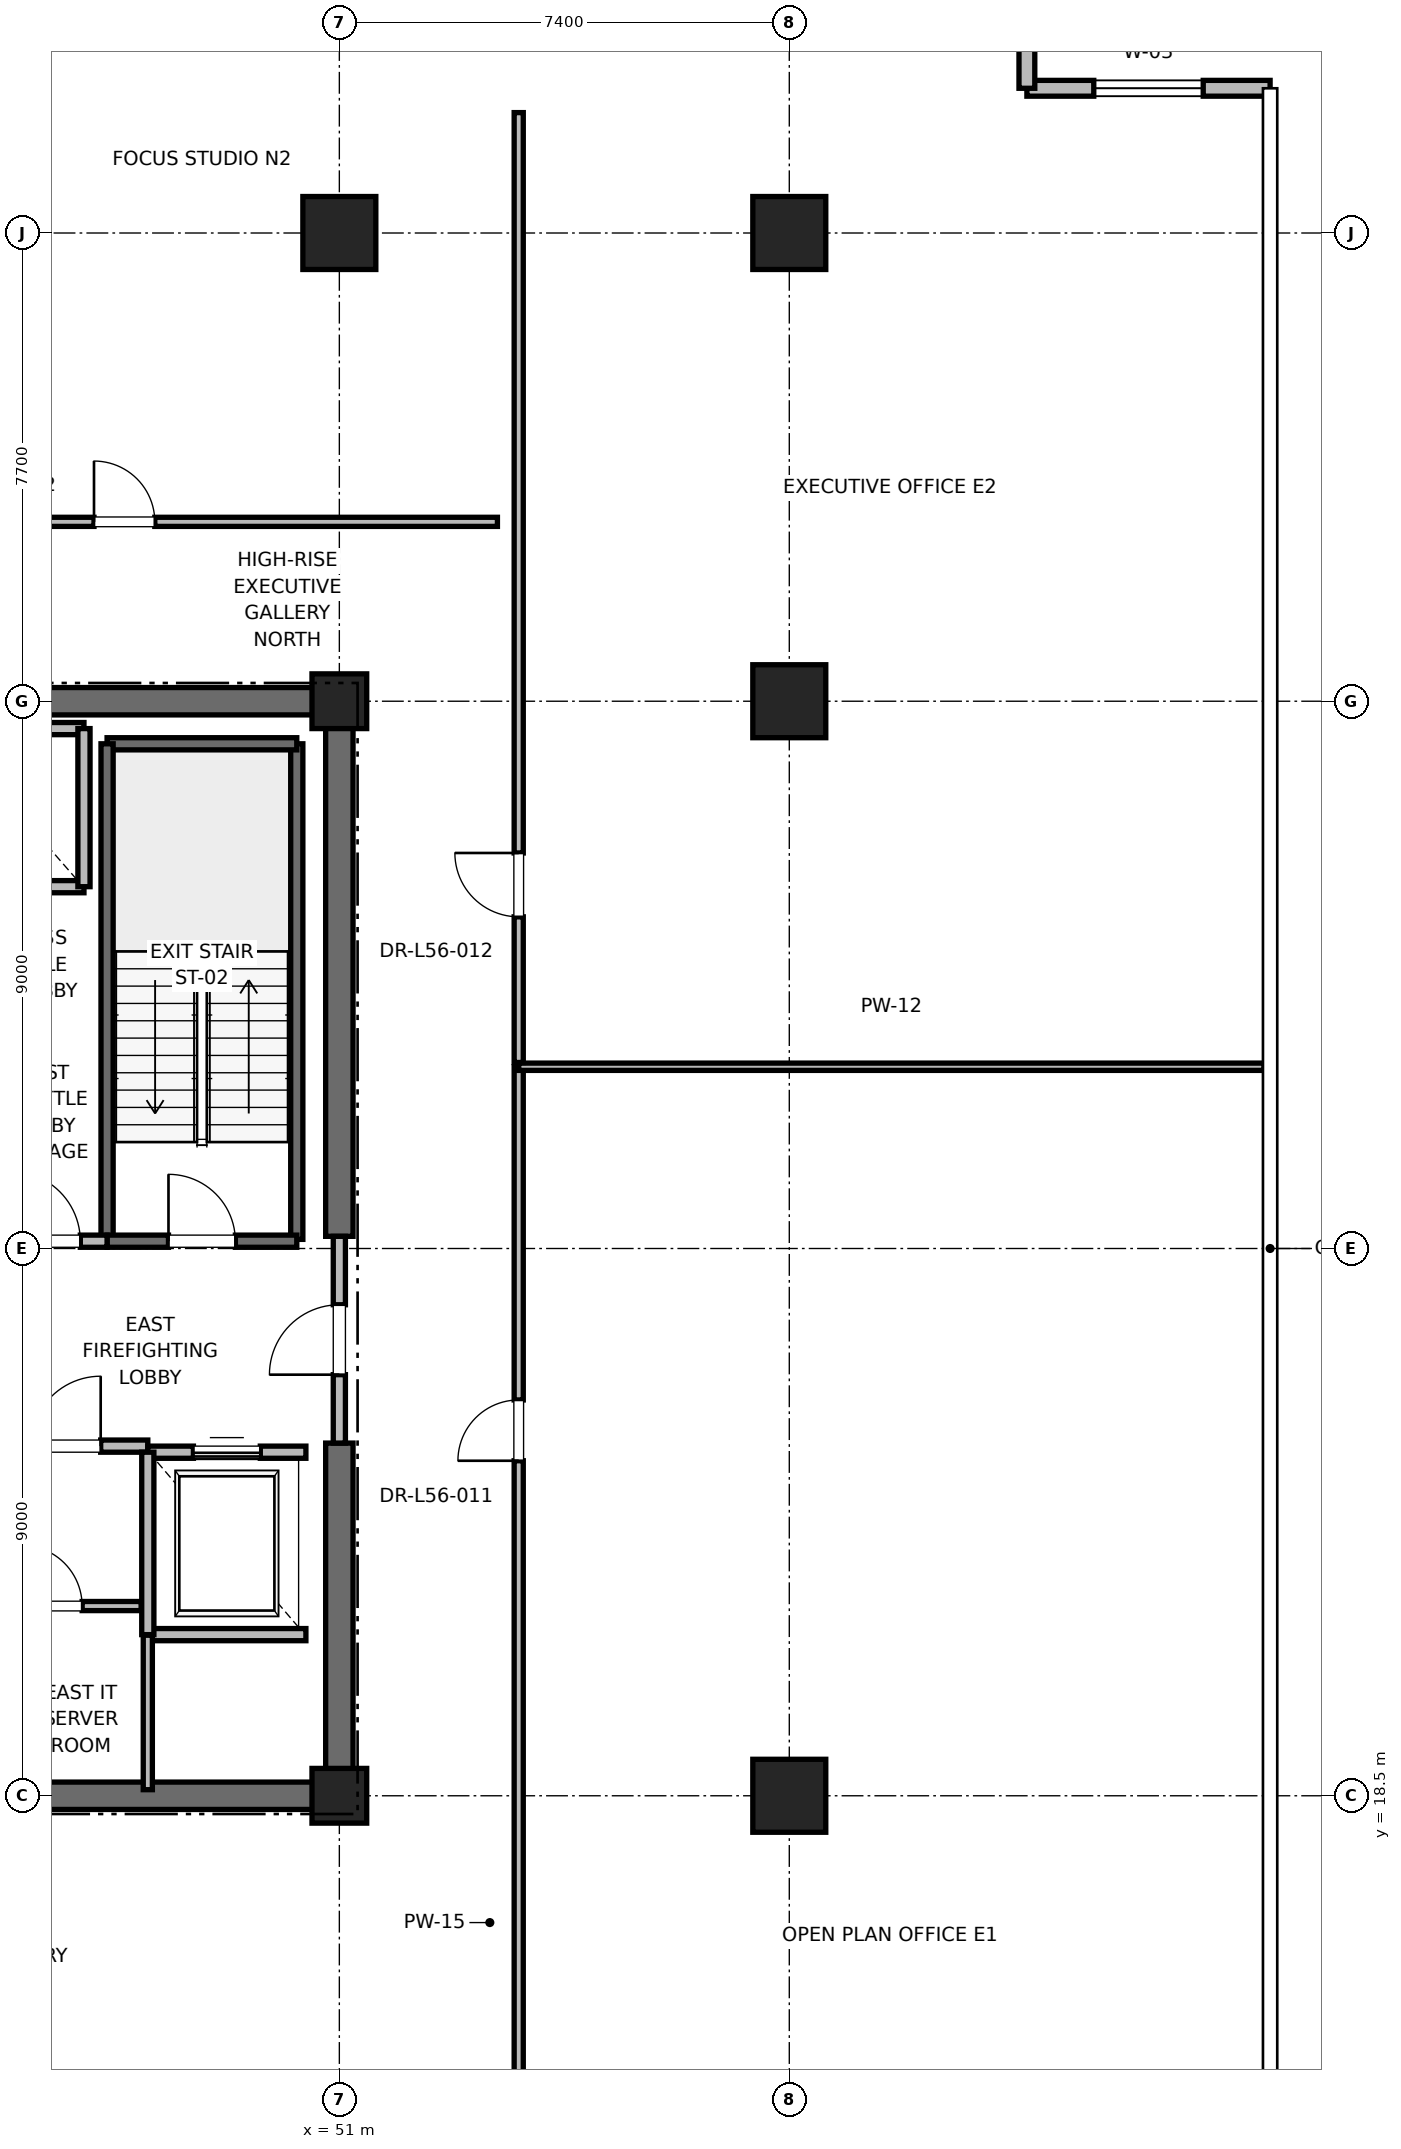
"""IFC4 building model, lengths in metres.
Left out: names, types, materials, properties, quantities, classifications, styles, units other than length and angle.
Written with IfcOpenShell. Run it as: python <this file> out.ifc"""

import sys

from ifc_helpers import new_model, si_unit, direction, frame, frame_2d, origin, origin_2d, place, context, subcontext, project, spatial, rectangle, extrude, element, fill, save


model = new_model("IFC4")
c1 = context("Model", 3, precision=1e-05, world=origin(), true_north=direction((0.0, 1.0)))
c2 = subcontext(c1, "Body", "Model", "MODEL_VIEW")
j1 = project(units=[si_unit("LENGTHUNIT", "METRE"), si_unit("PLANEANGLEUNIT", "RADIAN")], contexts=[c1])
p1 = place(None, origin())
s1 = spatial("IfcSite", under=j1, at=p1, CompositionType="ELEMENT")
p2 = place(p1, origin())
s2 = spatial("IfcBuilding", under=s1, at=p2, CompositionType="ELEMENT")
p3 = place(p2, frame((0.0, 0.0, 243.2)))
s3 = spatial("IfcBuildingStorey", under=s2, at=p3, CompositionType="ELEMENT", Elevation=243.2)
for number, where, z_axis, x_axis in (
    (1, (51.0, 44.2, 0.0), (0.0, 0.0, 1.0), (1.0, 0.0, 0.0)),
    (2, (58.4, 18.5, 0.0), (0.0, 0.0, 1.0), (1.0, 0.0, 0.0)),
    (3, (58.4, 36.5, 0.0), (0.0, 0.0, 1.0), (1.0, 0.0, 0.0)),
    (4, (58.4, 44.2, 0.0), (0.0, 0.0, 1.0), (1.0, 0.0, 0.0)),
):
    element("IfcColumn", number, at=place(p3, frame(where, z_axis=z_axis, x_axis=x_axis)), inside=s3, PredefinedType="COLUMN", context=c2, shape_type="SweptSolid", body=[
        extrude(rectangle(XDim=1.2, YDim=1.2, at=origin_2d()), origin(), (0.0, 0.0, 1.0), 4.0),
    ])
for number, where, z_axis, x_axis in (
    (5, (51.0, 18.5, 0.0), (0.0, 0.0, 1.0), (1.0, 0.0, 0.0)),
    (6, (51.0, 36.5, 0.0), (0.0, 0.0, 1.0), (1.0, 0.0, 0.0)),
):
    element("IfcColumn", number, at=place(p3, frame(where, z_axis=z_axis, x_axis=x_axis)), inside=s3, PredefinedType="PILASTER", context=c2, shape_type="SweptSolid", body=[
        extrude(rectangle(XDim=0.9, YDim=0.9, at=origin_2d()), origin(), (0.0, 0.0, 1.0), 4.0),
    ])
p4 = place(p3, frame((41.8, 18.5, 0.0), z_axis=(0.0, 0.0, 1.0), x_axis=(1.0, 0.0, 0.0)))
e7 = element("IfcWall", 7, at=p4, inside=s3, PredefinedType="SHEAR", context=c2, shape_type="SweptSolid", body=[
    extrude(rectangle(XDim=9.2, YDim=0.45, at=frame_2d((4.6, 0.0))), origin(), (0.0, 0.0, 1.0), 3.785),
])
for number, where, z_axis, x_axis in (
    (8, (45.2, 36.5, 0.0), (0.0, 0.0, 1.0), (1.0, 0.0, 0.0)),
    (9, (51.0, 18.5, 0.0), (0.0, 0.0, 1.0), (0.0, 1.0, 0.0)),
):
    element("IfcWall", number, at=place(p3, frame(where, z_axis=z_axis, x_axis=x_axis)), inside=s3, PredefinedType="SHEAR", context=c2, shape_type="SweptSolid", body=[
        extrude(rectangle(XDim=5.8, YDim=0.45, at=frame_2d((2.9, 0.0))), origin(), (0.0, 0.0, 1.0), 3.785),
    ])
p5 = place(p3, frame((51.0, 27.7, 0.0), z_axis=(0.0, 0.0, 1.0), x_axis=(0.0, 1.0, 0.0)))
e10 = element("IfcWall", 10, at=p5, inside=s3, PredefinedType="SHEAR", context=c2, shape_type="SweptSolid", body=[
    extrude(rectangle(XDim=8.8, YDim=0.45, at=frame_2d((4.4, 0.0))), origin(), (0.0, 0.0, 1.0), 3.785),
])
p6 = place(p3, frame((66.308, 46.58, 0.0), z_axis=(0.0, 0.0, 1.0), x_axis=(-1.0, 0.0, 0.0)))
e11 = element("IfcWall", 11, at=p6, inside=s3, PredefinedType="PARAPET", context=c2, shape_type="SweptSolid", body=[
    extrude(rectangle(XDim=4.0, YDim=0.26, at=frame_2d((2.0, 0.0))), origin(), (0.0, 0.0, 1.0), 3.785),
])
p7 = place(p6, frame((1.1, 0.0, 0.85)))
e12 = element("IfcOpeningElement", 12, at=p7, cuts=e11, PredefinedType="OPENING", context=c2, shape_type="SweptSolid", body=[
    extrude(rectangle(XDim=1.8, YDim=2.2, at=frame_2d((0.9, 1.1))), frame((0.0, 0.13, 0.0), z_axis=(0.0, -1.0, 0.0), x_axis=(1.0, 0.0, 0.0)), (0.0, 0.0, 1.0), 0.26),
])
p8 = place(p3, frame((62.308, 46.58, 0.0), z_axis=(0.0, 0.0, 1.0), x_axis=(0.0, 1.0, 0.0)))
e13 = element("IfcWall", 13, at=p8, inside=s3, PredefinedType="PARAPET", context=c2, shape_type="SweptSolid", body=[
    extrude(rectangle(XDim=3.5, YDim=0.26, at=frame_2d((1.75, 0.0))), origin(), (0.0, 0.0, 1.0), 3.785),
])
p9 = place(p3, frame((50.3, 27.65, 0.0), z_axis=(0.0, 0.0, 1.0), x_axis=(0.0, 1.0, 0.0)))
e14 = element("IfcWall", 14, at=p9, inside=s3, PredefinedType="SOLIDWALL", context=c2, shape_type="SweptSolid", body=[
    extrude(rectangle(XDim=8.15, YDim=0.2, at=frame_2d((4.075, 0.0))), origin(), (0.0, 0.0, 1.0), 3.785),
])
p10 = place(p3, frame((47.18, 35.8, 0.0), z_axis=(0.0, 0.0, 1.0), x_axis=(1.0, 0.0, 0.0)))
e15 = element("IfcWall", 15, at=p10, inside=s3, PredefinedType="SOLIDWALL", context=c2, shape_type="SweptSolid", body=[
    extrude(rectangle(XDim=3.12, YDim=0.2, at=frame_2d((1.56, 0.0))), origin(), (0.0, 0.0, 1.0), 3.785),
])
p11 = place(p3, frame((47.18, 27.62, 0.0), z_axis=(0.0, 0.0, 1.0), x_axis=(0.0, 1.0, 0.0)))
e16 = element("IfcWall", 16, at=p11, inside=s3, PredefinedType="SOLIDWALL", context=c2, shape_type="SweptSolid", body=[
    extrude(rectangle(XDim=8.18, YDim=0.2, at=frame_2d((4.09, 0.0))), origin(), (0.0, 0.0, 1.0), 3.785),
])
p12 = place(p3, frame((47.18, 27.62, 0.0), z_axis=(0.0, 0.0, 1.0), x_axis=(1.0, 0.0, 0.0)))
e17 = element("IfcWall", 17, at=p12, inside=s3, PredefinedType="SOLIDWALL", context=c2, shape_type="SweptSolid", body=[
    extrude(rectangle(XDim=3.12, YDim=0.2, at=frame_2d((1.56, 0.0))), origin(), (0.0, 0.0, 1.0), 3.785),
])
p13 = place(p12, frame((1.01, 0.0, 0.0)))
e18 = element("IfcOpeningElement", 18, at=p13, cuts=e17, PredefinedType="OPENING", context=c2, shape_type="SweptSolid", body=[
    extrude(rectangle(XDim=1.1, YDim=2.15, at=frame_2d((0.55, 1.075))), frame((0.0, 0.1, 0.0), z_axis=(0.0, -1.0, 0.0), x_axis=(1.0, 0.0, 0.0)), (0.0, 0.0, 1.0), 0.2),
])
p14 = place(p3, frame((45.15, 24.25, 0.0), z_axis=(0.0, 0.0, 1.0), x_axis=(1.0, 0.0, 0.0)))
e19 = element("IfcWall", 19, at=p14, inside=s3, PredefinedType="PARTITIONING", context=c2, shape_type="SweptSolid", body=[
    extrude(rectangle(XDim=2.7, YDim=0.2, at=frame_2d((1.35, 0.0))), origin(), (0.0, 0.0, 1.0), 3.785),
])
p15 = place(p14, frame((0.775, 0.0, 0.0)))
e20 = element("IfcOpeningElement", 20, at=p15, cuts=e19, PredefinedType="OPENING", context=c2, shape_type="SweptSolid", body=[
    extrude(rectangle(XDim=1.15, YDim=2.2, at=frame_2d((0.575, 1.1))), frame((0.0, 0.1, 0.0), z_axis=(0.0, -1.0, 0.0), x_axis=(1.0, 0.0, 0.0)), (0.0, 0.0, 1.0), 0.2),
])
p16 = place(p3, frame((45.15, 27.62, 0.0), z_axis=(0.0, 0.0, 1.0), x_axis=(1.0, 0.0, 0.0)))
e21 = element("IfcWall", 21, at=p16, inside=s3, PredefinedType="PARTITIONING", context=c2, shape_type="SweptSolid", body=[
    extrude(rectangle(XDim=2.03, YDim=0.2, at=frame_2d((1.015, 0.0))), origin(), (0.0, 0.0, 1.0), 3.785),
])
p17 = place(p16, frame((0.44, 0.0, 0.0)))
e22 = element("IfcOpeningElement", 22, at=p17, cuts=e21, PredefinedType="OPENING", context=c2, shape_type="SweptSolid", body=[
    extrude(rectangle(XDim=1.15, YDim=2.2, at=frame_2d((0.575, 1.1))), frame((0.0, 0.1, 0.0), z_axis=(0.0, -1.0, 0.0), x_axis=(1.0, 0.0, 0.0)), (0.0, 0.0, 1.0), 0.2),
])
p18 = place(p3, frame((51.0, 24.3, 0.0), z_axis=(0.0, 0.0, 1.0), x_axis=(0.0, 1.0, 0.0)))
e23 = element("IfcWall", 23, at=p18, inside=s3, PredefinedType="PARTITIONING", context=c2, shape_type="SweptSolid", body=[
    extrude(rectangle(XDim=3.4, YDim=0.2, at=frame_2d((1.7, 0.0))), origin(), (0.0, 0.0, 1.0), 2.865),
])
p19 = place(p18, frame((1.125, 0.0, 0.0)))
e24 = element("IfcOpeningElement", 24, at=p19, cuts=e23, PredefinedType="OPENING", context=c2, shape_type="SweptSolid", body=[
    extrude(rectangle(XDim=1.15, YDim=2.2, at=frame_2d((0.575, 1.1))), frame((0.0, 0.1, 0.0), z_axis=(0.0, -1.0, 0.0), x_axis=(1.0, 0.0, 0.0)), (0.0, 0.0, 1.0), 0.2),
])
p20 = place(p3, frame((47.85, 21.15, 0.0), z_axis=(0.0, 0.0, 1.0), x_axis=(1.0, 0.0, 0.0)))
e25 = element("IfcWall", 25, at=p20, inside=s3, PredefinedType="SOLIDWALL", context=c2, shape_type="SweptSolid", body=[
    extrude(rectangle(XDim=2.6, YDim=0.2, at=frame_2d((1.3, 0.0))), origin(), (0.0, 0.0, 1.0), 3.785),
])
p21 = place(p3, frame((50.45, 24.15, 0.0), z_axis=(0.0, 0.0, 1.0), x_axis=(-1.0, 0.0, 0.0)))
e26 = element("IfcWall", 26, at=p21, inside=s3, PredefinedType="SOLIDWALL", context=c2, shape_type="SweptSolid", body=[
    extrude(rectangle(XDim=2.6, YDim=0.2, at=frame_2d((1.3, 0.0))), origin(), (0.0, 0.0, 1.0), 2.865),
])
p22 = place(p21, frame((0.75, 0.0, 0.0)))
e27 = element("IfcOpeningElement", 27, at=p22, cuts=e26, PredefinedType="OPENING", context=c2, shape_type="SweptSolid", body=[
    extrude(rectangle(XDim=1.1, YDim=2.2, at=frame_2d((0.55, 1.1))), frame((0.0, 0.1, 0.0), z_axis=(0.0, -1.0, 0.0), x_axis=(1.0, 0.0, 0.0)), (0.0, 0.0, 1.0), 0.2),
])
p23 = place(p3, frame((47.85, 24.15, 0.0), z_axis=(0.0, 0.0, 1.0), x_axis=(0.0, -1.0, 0.0)))
e28 = element("IfcWall", 28, at=p23, inside=s3, PredefinedType="SOLIDWALL", context=c2, shape_type="SweptSolid", body=[
    extrude(rectangle(XDim=3.0, YDim=0.2, at=frame_2d((1.5, 0.0))), origin(), (0.0, 0.0, 1.0), 3.785),
])
p24 = place(p3, frame((44.5, 33.45, 0.0), z_axis=(0.0, 0.0, 1.0), x_axis=(1.0, 0.0, 0.0)))
e29 = element("IfcWall", 29, at=p24, inside=s3, PredefinedType="SOLIDWALL", context=c2, shape_type="SweptSolid", body=[
    extrude(rectangle(XDim=2.3, YDim=0.2, at=frame_2d((1.15, 0.0))), origin(), (0.0, 0.0, 1.0), 3.785),
])
p25 = place(p3, frame((46.8, 36.05, 0.0), z_axis=(0.0, 0.0, 1.0), x_axis=(-1.0, 0.0, 0.0)))
e30 = element("IfcWall", 30, at=p25, inside=s3, PredefinedType="SOLIDWALL", context=c2, shape_type="SweptSolid", body=[
    extrude(rectangle(XDim=2.3, YDim=0.2, at=frame_2d((1.15, 0.0))), origin(), (0.0, 0.0, 1.0), 2.865),
])
p26 = place(p3, frame((46.8, 33.45, 0.0), z_axis=(0.0, 0.0, 1.0), x_axis=(0.0, 1.0, 0.0)))
e31 = element("IfcWall", 31, at=p26, inside=s3, PredefinedType="SOLIDWALL", context=c2, shape_type="SweptSolid", body=[
    extrude(rectangle(XDim=2.6, YDim=0.2, at=frame_2d((1.3, 0.0))), origin(), (0.0, 0.0, 1.0), 3.785),
])
p27 = place(p3, frame((47.85, 18.6, 0.0), z_axis=(0.0, 0.0, 1.0), x_axis=(0.0, 1.0, 0.0)))
e32 = element("IfcWall", 32, at=p27, inside=s3, PredefinedType="PARTITIONING", context=c2, shape_type="SweptSolid", body=[
    extrude(rectangle(XDim=2.54, YDim=0.15, at=frame_2d((1.27, 0.0))), origin(), (0.0, 0.0, 1.0), 2.85),
])
p28 = place(p3, frame((44.8, 21.62, 0.0), z_axis=(0.0, 0.0, 1.0), x_axis=(1.0, 0.0, 0.0)))
e33 = element("IfcWall", 33, at=p28, inside=s3, PredefinedType="PARTITIONING", context=c2, shape_type="SweptSolid", body=[
    extrude(rectangle(XDim=2.94, YDim=0.15, at=frame_2d((1.47, 0.0))), origin(), (0.0, 0.0, 1.0), 2.85),
])
p29 = place(p28, frame((0.97, 0.0, 0.0)))
e34 = element("IfcOpeningElement", 34, at=p29, cuts=e33, PredefinedType="OPENING", context=c2, shape_type="SweptSolid", body=[
    extrude(rectangle(XDim=1.0, YDim=2.15, at=frame_2d((0.5, 1.075))), frame((0.0, 0.075, 0.0), z_axis=(0.0, -1.0, 0.0), x_axis=(1.0, 0.0, 0.0)), (0.0, 0.0, 1.0), 0.15),
])
p30 = place(p3, frame((41.43, 39.45, 0.0), z_axis=(0.0, 0.0, 1.0), x_axis=(1.0, 0.0, 0.0)))
e35 = element("IfcWall", 35, at=p30, inside=s3, PredefinedType="PARTITIONING", context=c2, shape_type="SweptSolid", body=[
    extrude(rectangle(XDim=12.17, YDim=0.15, at=frame_2d((6.085, 0.0))), origin(), (0.0, 0.0, 1.0), 2.85),
])
p31 = place(p30, frame((5.535, 0.0, 0.0)))
e36 = element("IfcOpeningElement", 36, at=p31, cuts=e35, PredefinedType="OPENING", context=c2, shape_type="SweptSolid", body=[
    extrude(rectangle(XDim=1.0, YDim=2.15, at=frame_2d((0.5, 1.075))), frame((0.0, 0.075, 0.0), z_axis=(0.0, -1.0, 0.0), x_axis=(1.0, 0.0, 0.0)), (0.0, 0.0, 1.0), 0.15),
])
p32 = place(p3, frame((53.95, 8.82, 0.0), z_axis=(0.0, 0.0, 1.0), x_axis=(0.0, 1.0, 0.0)))
e37 = element("IfcWall", 37, at=p32, inside=s3, PredefinedType="PARTITIONING", context=c2, shape_type="SweptSolid", body=[
    extrude(rectangle(XDim=21.669, YDim=0.15, at=frame_2d((10.834, 0.0))), origin(), (0.0, 0.0, 1.0), 2.85),
])
p33 = place(p32, frame((15.189, 0.0, 0.0)))
e38 = element("IfcOpeningElement", 38, at=p33, cuts=e37, PredefinedType="OPENING", context=c2, shape_type="SweptSolid", body=[
    extrude(rectangle(XDim=1.0, YDim=2.15, at=frame_2d((0.5, 1.075))), frame((0.0, 0.075, 0.0), z_axis=(0.0, -1.0, 0.0), x_axis=(1.0, 0.0, 0.0)), (0.0, 0.0, 1.0), 0.15),
])
p34 = place(p3, frame((53.95, 30.489, 0.0), z_axis=(0.0, 0.0, 1.0), x_axis=(1.0, 0.0, 0.0)))
e39 = element("IfcWall", 39, at=p34, inside=s3, PredefinedType="PARTITIONING", context=c2, shape_type="SweptSolid", body=[
    extrude(rectangle(XDim=12.258, YDim=0.12, at=frame_2d((6.129, 0.0))), origin(), (0.0, 0.0, 1.0), 2.85),
])
p35 = place(p3, frame((53.95, 30.559, 0.0), z_axis=(0.0, 0.0, 1.0), x_axis=(0.0, 1.0, 0.0)))
e40 = element("IfcWall", 40, at=p35, inside=s3, PredefinedType="PARTITIONING", context=c2, shape_type="SweptSolid", body=[
    extrude(rectangle(XDim=15.621, YDim=0.15, at=frame_2d((7.811, 0.0))), origin(), (0.0, 0.0, 1.0), 2.85),
])
p36 = place(p35, frame((2.396, 0.0, 0.0)))
e41 = element("IfcOpeningElement", 41, at=p36, cuts=e40, PredefinedType="OPENING", context=c2, shape_type="SweptSolid", body=[
    extrude(rectangle(XDim=1.05, YDim=2.2, at=frame_2d((0.525, 1.1))), frame((0.0, 0.075, 0.0), z_axis=(0.0, -1.0, 0.0), x_axis=(1.0, 0.0, 0.0)), (0.0, 0.0, 1.0), 0.15),
])
p37 = place(p7, origin())
e42 = element("IfcWindow", 42, at=p37, inside=s3, PartitioningType="SINGLE_PANEL", PredefinedType="WINDOW", context=c2, shape_type="SweptSolid", body=[
    extrude(rectangle(XDim=1.8, YDim=2.2, at=frame_2d((0.9, 1.1))), frame((0.0, 0.03, 0.0), z_axis=(0.0, -1.0, 0.0), x_axis=(1.0, 0.0, 0.0)), (0.0, 0.0, 1.0), 0.06),
])
fill(e12, e42)
p38 = place(p13, origin())
e43 = element("IfcDoor", 43, at=p38, inside=s3, OperationType="SINGLE_SWING_LEFT", PredefinedType="DOOR", context=c2, shape_type="SweptSolid", body=[
    extrude(rectangle(XDim=1.1, YDim=2.15, at=frame_2d((0.55, 1.075))), frame((0.0, 0.025, 0.0), z_axis=(0.0, -1.0, 0.0), x_axis=(1.0, 0.0, 0.0)), (0.0, 0.0, 1.0), 0.05),
])
fill(e18, e43)
p39 = place(p15, origin())
e44 = element("IfcDoor", 44, at=p39, inside=s3, OperationType="SINGLE_SWING_RIGHT", PredefinedType="DOOR", context=c2, shape_type="SweptSolid", body=[
    extrude(rectangle(XDim=1.15, YDim=2.2, at=frame_2d((0.575, 1.1))), frame((0.0, 0.025, 0.0), z_axis=(0.0, -1.0, 0.0), x_axis=(1.0, 0.0, 0.0)), (0.0, 0.0, 1.0), 0.05),
])
fill(e20, e44)
p40 = place(p17, origin())
e45 = element("IfcDoor", 45, at=p40, inside=s3, OperationType="SINGLE_SWING_LEFT", PredefinedType="DOOR", context=c2, shape_type="SweptSolid", body=[
    extrude(rectangle(XDim=1.15, YDim=2.2, at=frame_2d((0.575, 1.1))), frame((0.0, 0.025, 0.0), z_axis=(0.0, -1.0, 0.0), x_axis=(1.0, 0.0, 0.0)), (0.0, 0.0, 1.0), 0.05),
])
fill(e22, e45)
p41 = place(p19, origin())
e46 = element("IfcDoor", 46, at=p41, inside=s3, OperationType="SINGLE_SWING_LEFT", PredefinedType="DOOR", context=c2, shape_type="SweptSolid", body=[
    extrude(rectangle(XDim=1.15, YDim=2.2, at=frame_2d((0.575, 1.1))), frame((0.0, 0.025, 0.0), z_axis=(0.0, -1.0, 0.0), x_axis=(1.0, 0.0, 0.0)), (0.0, 0.0, 1.0), 0.05),
])
fill(e24, e46)
p42 = place(p22, origin())
e47 = element("IfcDoor", 47, at=p42, inside=s3, OperationType="SLIDING_TO_RIGHT", PredefinedType="DOOR", context=c2, shape_type="SweptSolid", body=[
    extrude(rectangle(XDim=1.1, YDim=2.2, at=frame_2d((0.55, 1.1))), frame((0.0, 0.025, 0.0), z_axis=(0.0, -1.0, 0.0), x_axis=(1.0, 0.0, 0.0)), (0.0, 0.0, 1.0), 0.05),
])
fill(e27, e47)
p43 = place(p29, origin())
e48 = element("IfcDoor", 48, at=p43, inside=s3, OperationType="SINGLE_SWING_LEFT", PredefinedType="DOOR", context=c2, shape_type="SweptSolid", body=[
    extrude(rectangle(XDim=1.0, YDim=2.15, at=frame_2d((0.5, 1.075))), frame((0.0, 0.025, 0.0), z_axis=(0.0, -1.0, 0.0), x_axis=(1.0, 0.0, 0.0)), (0.0, 0.0, 1.0), 0.05),
])
fill(e34, e48)
p44 = place(p31, origin())
e49 = element("IfcDoor", 49, at=p44, inside=s3, OperationType="SINGLE_SWING_LEFT", PredefinedType="DOOR", context=c2, shape_type="SweptSolid", body=[
    extrude(rectangle(XDim=1.0, YDim=2.15, at=frame_2d((0.5, 1.075))), frame((0.0, 0.025, 0.0), z_axis=(0.0, -1.0, 0.0), x_axis=(1.0, 0.0, 0.0)), (0.0, 0.0, 1.0), 0.05),
])
fill(e36, e49)
p45 = place(p33, origin())
e50 = element("IfcDoor", 50, at=p45, inside=s3, OperationType="SINGLE_SWING_LEFT", PredefinedType="DOOR", context=c2, shape_type="SweptSolid", body=[
    extrude(rectangle(XDim=1.0, YDim=2.15, at=frame_2d((0.5, 1.075))), frame((0.0, 0.025, 0.0), z_axis=(0.0, -1.0, 0.0), x_axis=(1.0, 0.0, 0.0)), (0.0, 0.0, 1.0), 0.05),
])
fill(e38, e50)
p46 = place(p36, origin())
e51 = element("IfcDoor", 51, at=p46, inside=s3, OperationType="SINGLE_SWING_RIGHT", PredefinedType="DOOR", context=c2, shape_type="SweptSolid", body=[
    extrude(rectangle(XDim=1.05, YDim=2.2, at=frame_2d((0.525, 1.1))), frame((0.0, 0.025, 0.0), z_axis=(0.0, -1.0, 0.0), x_axis=(1.0, 0.0, 0.0)), (0.0, 0.0, 1.0), 0.05),
])
fill(e41, e51)
save(model, sys.argv[1])
